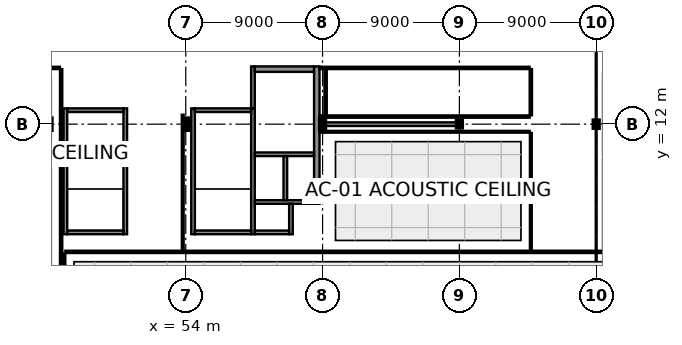
"""IFC4 building model, lengths in metres.
Left out: names, types, materials, properties, quantities, classifications, styles, units other than length and angle.
Written with IfcOpenShell. Run it as: python <this file> out.ifc"""

import sys

from ifc_helpers import new_model, si_unit, direction, frame, frame_2d, origin, origin_2d, place, context, subcontext, project, spatial, rectangle, i_section, extrude, element, fill, save


model = new_model("IFC4")
c1 = context("Model", 3, precision=1e-05, world=origin(), true_north=direction((0.0, 1.0)))
c2 = subcontext(c1, "Body", "Model", "MODEL_VIEW")
j1 = project(units=[si_unit("LENGTHUNIT", "METRE"), si_unit("PLANEANGLEUNIT", "RADIAN")], contexts=[c1])
p1 = place(None, origin())
s1 = spatial("IfcSite", under=j1, at=p1, CompositionType="ELEMENT")
p2 = place(p1, origin())
s2 = spatial("IfcBuilding", under=s1, at=p2, CompositionType="ELEMENT")
p3 = place(p2, frame((0.0, 0.0, 5.4)))
s3 = spatial("IfcBuildingStorey", under=s2, at=p3, CompositionType="ELEMENT", Elevation=5.4)
p4 = place(p3, frame((54.0, 12.0, 0.0), z_axis=(0.0, 0.0, 1.0), x_axis=(1.0, 0.0, 0.0)))
e1 = element("IfcColumn", 1, at=p4, inside=s3, PredefinedType="COLUMN", context=c2, shape_type="SweptSolid", body=[
    extrude(i_section(OverallWidth=0.304, OverallDepth=0.716, WebThickness=0.021, FlangeThickness=0.04, at=origin_2d()), origin(), (0.0, 0.0, 1.0), 4.5),
])
p5 = place(p3, frame((63.0, 12.0, 0.0), z_axis=(0.0, 0.0, 1.0), x_axis=(1.0, 0.0, 0.0)))
e2 = element("IfcColumn", 2, at=p5, inside=s3, PredefinedType="COLUMN", context=c2, shape_type="SweptSolid", body=[
    extrude(i_section(OverallWidth=0.3, OverallDepth=0.5, WebThickness=0.014, FlangeThickness=0.028, at=origin_2d()), origin(), (0.0, 0.0, 1.0), 4.5),
])
p6 = place(p3, frame((72.0, 12.0, 0.0), z_axis=(0.0, 0.0, 1.0), x_axis=(0.0, 1.0, 0.0)))
e3 = element("IfcColumn", 3, at=p6, inside=s3, PredefinedType="COLUMN", context=c2, shape_type="SweptSolid", body=[
    extrude(i_section(OverallWidth=0.3, OverallDepth=0.4, WebThickness=0.013, FlangeThickness=0.024, at=origin_2d()), origin(), (0.0, 0.0, 1.0), 4.5),
])
p7 = place(p3, frame((81.0, 12.0, 0.0), z_axis=(0.0, 0.0, 1.0), x_axis=(1.0, 0.0, 0.0)))
e4 = element("IfcColumn", 4, at=p7, inside=s3, PredefinedType="COLUMN", context=c2, shape_type="SweptSolid", body=[
    extrude(i_section(OverallWidth=0.3, OverallDepth=0.45, WebThickness=0.014, FlangeThickness=0.026, at=origin_2d()), origin(), (0.0, 0.0, 1.0), 4.5),
])
p8 = place(p3, frame((54.48, 4.76, 0.0), z_axis=(0.0, 0.0, 1.0), x_axis=(0.0, 1.0, 0.0)))
e5 = element("IfcWall", 5, at=p8, inside=s3, PredefinedType="SHEAR", context=c2, shape_type="SweptSolid", body=[
    extrude(rectangle(XDim=8.28, YDim=0.24, at=frame_2d((4.14, 0.0))), origin(), (0.0, 0.0, 1.0), 4.31),
])
p9 = place(p3, frame((58.42, 4.76, 0.0), z_axis=(0.0, 0.0, 1.0), x_axis=(0.0, 1.0, 0.0)))
e6 = element("IfcWall", 6, at=p9, inside=s3, PredefinedType="SHEAR", context=c2, shape_type="SweptSolid", body=[
    extrude(rectangle(XDim=8.28, YDim=0.24, at=frame_2d((4.14, 0.0))), origin(), (0.0, 0.0, 1.0), 4.31),
])
p10 = place(p9, frame((6.49, 0.0, 0.0)))
e7 = element("IfcOpeningElement", 7, at=p10, cuts=e6, PredefinedType="OPENING", context=c2, shape_type="SweptSolid", body=[
    extrude(rectangle(XDim=1.3, YDim=2.2, at=frame_2d((0.65, 1.1))), frame((0.0, 0.135, 0.0), z_axis=(0.0, -1.0, 0.0), x_axis=(1.0, 0.0, 0.0)), (0.0, 0.0, 1.0), 0.27),
])
for number, where, z_axis, x_axis in (
    (8, (54.6, 4.88, 0.0), (0.0, 0.0, 1.0), (1.0, 0.0, 0.0)),
    (9, (54.6, 12.92, 0.0), (0.0, 0.0, 1.0), (1.0, 0.0, 0.0)),
):
    element("IfcWall", number, at=place(p3, frame(where, z_axis=z_axis, x_axis=x_axis)), inside=s3, PredefinedType="SHEAR", context=c2, shape_type="SweptSolid", body=[
        extrude(rectangle(XDim=3.7, YDim=0.24, at=frame_2d((1.85, 0.0))), origin(), (0.0, 0.0, 1.0), 4.31),
    ])
p11 = place(p3, frame((46.08, 4.76, 0.0), z_axis=(0.0, 0.0, 1.0), x_axis=(0.0, 1.0, 0.0)))
e10 = element("IfcWall", 10, at=p11, inside=s3, PredefinedType="SHEAR", context=c2, shape_type="SweptSolid", body=[
    extrude(rectangle(XDim=8.28, YDim=0.24, at=frame_2d((4.14, 0.0))), origin(), (0.0, 0.0, 1.0), 4.31),
])
p12 = place(p3, frame((50.02, 4.76, 0.0), z_axis=(0.0, 0.0, 1.0), x_axis=(0.0, 1.0, 0.0)))
e11 = element("IfcWall", 11, at=p12, inside=s3, PredefinedType="SHEAR", context=c2, shape_type="SweptSolid", body=[
    extrude(rectangle(XDim=8.28, YDim=0.24, at=frame_2d((4.14, 0.0))), origin(), (0.0, 0.0, 1.0), 4.31),
])
p13 = place(p12, frame((6.49, 0.0, 0.0)))
e12 = element("IfcOpeningElement", 12, at=p13, cuts=e11, PredefinedType="OPENING", context=c2, shape_type="SweptSolid", body=[
    extrude(rectangle(XDim=1.3, YDim=2.2, at=frame_2d((0.65, 1.1))), frame((0.0, 0.135, 0.0), z_axis=(0.0, -1.0, 0.0), x_axis=(1.0, 0.0, 0.0)), (0.0, 0.0, 1.0), 0.27),
])
for number, where, z_axis, x_axis in (
    (13, (46.2, 4.88, 0.0), (0.0, 0.0, 1.0), (1.0, 0.0, 0.0)),
    (14, (46.2, 12.92, 0.0), (0.0, 0.0, 1.0), (1.0, 0.0, 0.0)),
):
    element("IfcWall", number, at=place(p3, frame(where, z_axis=z_axis, x_axis=x_axis)), inside=s3, PredefinedType="SHEAR", context=c2, shape_type="SweptSolid", body=[
        extrude(rectangle(XDim=3.7, YDim=0.24, at=frame_2d((1.85, 0.0))), origin(), (0.0, 0.0, 1.0), 4.31),
    ])
p14 = place(p3, frame((58.42, 13.04, 0.0), z_axis=(0.0, 0.0, 1.0), x_axis=(0.0, 1.0, 0.0)))
e15 = element("IfcWall", 15, at=p14, inside=s3, PredefinedType="SHEAR", context=c2, shape_type="SweptSolid", body=[
    extrude(rectangle(XDim=2.76, YDim=0.24, at=frame_2d((1.38, 0.0))), origin(), (0.0, 0.0, 1.0), 4.16),
])
p15 = place(p3, frame((58.54, 15.62, 0.0), z_axis=(0.0, 0.0, 1.0), x_axis=(1.0, 0.0, 0.0)))
e16 = element("IfcWall", 16, at=p15, inside=s3, PredefinedType="SHEAR", context=c2, shape_type="SweptSolid", body=[
    extrude(rectangle(XDim=3.9, YDim=0.36, at=frame_2d((1.95, 0.0))), origin(), (0.0, 0.0, 1.0), 4.16),
])
p16 = place(p15, frame((1.15, 0.0, 0.0)))
e17 = element("IfcOpeningElement", 17, at=p16, cuts=e16, PredefinedType="OPENING", context=c2, shape_type="SweptSolid", body=[
    extrude(rectangle(XDim=1.6, YDim=2.25, at=frame_2d((0.8, 1.125))), frame((0.0, 0.195, 0.0), z_axis=(0.0, -1.0, 0.0), x_axis=(1.0, 0.0, 0.0)), (0.0, 0.0, 1.0), 0.39),
])
p17 = place(p3, frame((62.62, 6.76, 0.0), z_axis=(0.0, 0.0, 1.0), x_axis=(0.0, 1.0, 0.0)))
e18 = element("IfcWall", 18, at=p17, inside=s3, PredefinedType="SHEAR", context=c2, shape_type="SweptSolid", body=[
    extrude(rectangle(XDim=9.04, YDim=0.36, at=frame_2d((4.52, 0.0))), origin(), (0.0, 0.0, 1.0), 4.16),
])
p18 = place(p3, frame((58.54, 10.02, 0.0), z_axis=(0.0, 0.0, 1.0), x_axis=(1.0, 0.0, 0.0)))
e19 = element("IfcWall", 19, at=p18, inside=s3, PredefinedType="SHEAR", context=c2, shape_type="SweptSolid", body=[
    extrude(rectangle(XDim=3.9, YDim=0.24, at=frame_2d((1.95, 0.0))), origin(), (0.0, 0.0, 1.0), 4.31),
])
p19 = place(p18, frame((0.235, 0.0, 0.0)))
e20 = element("IfcOpeningElement", 20, at=p19, cuts=e19, PredefinedType="OPENING", context=c2, shape_type="SweptSolid", body=[
    extrude(rectangle(XDim=1.6, YDim=2.3, at=frame_2d((0.8, 1.15))), frame((0.0, 0.135, 0.0), z_axis=(0.0, -1.0, 0.0), x_axis=(1.0, 0.0, 0.0)), (0.0, 0.0, 1.0), 0.27),
])
p20 = place(p18, frame((2.185, 0.0, 0.0)))
e21 = element("IfcOpeningElement", 21, at=p20, cuts=e19, PredefinedType="OPENING", context=c2, shape_type="SweptSolid", body=[
    extrude(rectangle(XDim=1.6, YDim=2.3, at=frame_2d((0.8, 1.15))), frame((0.0, 0.135, 0.0), z_axis=(0.0, -1.0, 0.0), x_axis=(1.0, 0.0, 0.0)), (0.0, 0.0, 1.0), 0.27),
])
p21 = place(p3, frame((58.54, 6.88, 0.0), z_axis=(0.0, 0.0, 1.0), x_axis=(1.0, 0.0, 0.0)))
e22 = element("IfcWall", 22, at=p21, inside=s3, PredefinedType="SHEAR", context=c2, shape_type="SweptSolid", body=[
    extrude(rectangle(XDim=3.9, YDim=0.24, at=frame_2d((1.95, 0.0))), origin(), (0.0, 0.0, 1.0), 4.31),
])
p22 = place(p3, frame((60.55, 7.0, 0.0), z_axis=(0.0, 0.0, 1.0), x_axis=(0.0, 1.0, 0.0)))
e23 = element("IfcWall", 23, at=p22, inside=s3, PredefinedType="SHEAR", context=c2, shape_type="SweptSolid", body=[
    extrude(rectangle(XDim=2.9, YDim=0.24, at=frame_2d((1.45, 0.0))), origin(), (0.0, 0.0, 1.0), 4.31),
])
p23 = place(p3, frame((60.92, 4.76, 0.0), z_axis=(0.0, 0.0, 1.0), x_axis=(0.0, 1.0, 0.0)))
e24 = element("IfcWall", 24, at=p23, inside=s3, PredefinedType="SHEAR", context=c2, shape_type="SweptSolid", body=[
    extrude(rectangle(XDim=2.0, YDim=0.24, at=frame_2d((1.0, 0.0))), origin(), (0.0, 0.0, 1.0), 4.31),
])
p24 = place(p3, frame((58.54, 4.88, 0.0), z_axis=(0.0, 0.0, 1.0), x_axis=(1.0, 0.0, 0.0)))
e25 = element("IfcWall", 25, at=p24, inside=s3, PredefinedType="SHEAR", context=c2, shape_type="SweptSolid", body=[
    extrude(rectangle(XDim=2.26, YDim=0.24, at=frame_2d((1.13, 0.0))), origin(), (0.0, 0.0, 1.0), 4.31),
])
p25 = place(p3, frame((63.008, 12.0, 0.0), z_axis=(0.0, 0.0, 1.0), x_axis=(1.0, 0.0, 0.0)))
e26 = element("IfcWall", 26, at=p25, inside=s3, PredefinedType="SHEAR", context=c2, shape_type="SweptSolid", body=[
    extrude(rectangle(XDim=8.794, YDim=0.24, at=frame_2d((4.397, 0.0))), origin(), (0.0, 0.0, 1.0), 3.585),
])
p26 = place(p3, frame((46.0, 0.145, 0.0), z_axis=(0.0, 0.0, 1.0), x_axis=(0.0, 1.0, 0.0)))
e27 = element("IfcWall", 27, at=p26, inside=s3, PredefinedType="PARTITIONING", context=c2, shape_type="SweptSolid", body=[
    extrude(rectangle(XDim=3.375, YDim=0.15, at=frame_2d((1.688, 0.0))), origin(), (0.0, 0.0, 1.0), 4.14),
])
p27 = place(p3, frame((46.08, 3.6, 0.0), z_axis=(0.0, 0.0, 1.0), x_axis=(1.0, 0.0, 0.0)))
e28 = element("IfcWall", 28, at=p27, inside=s3, PredefinedType="PARTITIONING", context=c2, shape_type="SweptSolid", body=[
    extrude(rectangle(XDim=71.04, YDim=0.15, at=frame_2d((35.52, 0.0))), origin(), (0.0, 0.0, 1.0), 4.14),
])
p28 = place(p27, frame((31.995, 0.0, 0.0)))
e29 = element("IfcOpeningElement", 29, at=p28, cuts=e28, PredefinedType="OPENING", context=c2, shape_type="SweptSolid", body=[
    extrude(rectangle(XDim=1.05, YDim=2.25, at=frame_2d((0.525, 1.125))), frame((0.0, 0.09, 0.0), z_axis=(0.0, -1.0, 0.0), x_axis=(1.0, 0.0, 0.0)), (0.0, 0.0, 1.0), 0.18),
])
p29 = place(p27, frame((68.39, 0.0, 1.05)))
e30 = element("IfcOpeningElement", 30, at=p29, cuts=e28, PredefinedType="OPENING", context=c2, shape_type="SweptSolid", body=[
    extrude(rectangle(XDim=1.8, YDim=1.1, at=frame_2d((0.9, 0.55))), frame((0.0, 0.09, 0.0), z_axis=(0.0, -1.0, 0.0), x_axis=(1.0, 0.0, 0.0)), (0.0, 0.0, 1.0), 0.18),
])
p30 = place(p3, frame((53.8, 12.62, 0.0), z_axis=(0.0, 0.0, 1.0), x_axis=(0.0, -1.0, 0.0)))
e31 = element("IfcWall", 31, at=p30, inside=s3, PredefinedType="PARTITIONING", context=c2, shape_type="SweptSolid", body=[
    extrude(rectangle(XDim=8.95, YDim=0.12, at=frame_2d((4.475, 0.0))), origin(), (0.0, 0.0, 1.0), 3.735),
])
p31 = place(p3, frame((32.545, 15.7, 0.0), z_axis=(0.0, 0.0, 1.0), x_axis=(1.0, 0.0, 0.0)))
e32 = element("IfcWall", 32, at=p31, inside=s3, PredefinedType="PARTITIONING", context=c2, shape_type="SweptSolid", body=[
    extrude(rectangle(XDim=13.175, YDim=0.15, at=frame_2d((6.587, 0.0))), origin(), (0.0, 0.0, 1.0), 4.14),
])
p32 = place(p31, frame((6.062, 0.0, 0.0)))
e33 = element("IfcOpeningElement", 33, at=p32, cuts=e32, PredefinedType="OPENING", context=c2, shape_type="SweptSolid", body=[
    extrude(rectangle(XDim=1.05, YDim=2.25, at=frame_2d((0.525, 1.125))), frame((0.0, 0.09, 0.0), z_axis=(0.0, -1.0, 0.0), x_axis=(1.0, 0.0, 0.0)), (0.0, 0.0, 1.0), 0.18),
])
p33 = place(p3, frame((45.8, 15.62, 0.0), z_axis=(0.0, 0.0, 1.0), x_axis=(0.0, -1.0, 0.0)))
e34 = element("IfcWall", 34, at=p33, inside=s3, PredefinedType="PARTITIONING", context=c2, shape_type="SweptSolid", body=[
    extrude(rectangle(XDim=15.475, YDim=0.15, at=frame_2d((7.738, 0.0))), origin(), (0.0, 0.0, 1.0), 4.14),
])
p34 = place(p3, frame((76.7, 11.42, 0.0), z_axis=(0.0, 0.0, 1.0), x_axis=(0.0, -1.0, 0.0)))
e35 = element("IfcWall", 35, at=p34, inside=s3, PredefinedType="PARTITIONING", context=c2, shape_type="SweptSolid", body=[
    extrude(rectangle(XDim=7.75, YDim=0.12, at=frame_2d((3.875, 0.0))), origin(), (0.0, 0.0, 1.0), 4.14),
])
p35 = place(p34, frame((3.425, 0.0, 0.0)))
e36 = element("IfcOpeningElement", 36, at=p35, cuts=e35, PredefinedType="OPENING", context=c2, shape_type="SweptSolid", body=[
    extrude(rectangle(XDim=0.9, YDim=2.1, at=frame_2d((0.45, 1.05))), frame((0.0, 0.075, 0.0), z_axis=(0.0, -1.0, 0.0), x_axis=(1.0, 0.0, 0.0)), (0.0, 0.0, 1.0), 0.15),
])
p36 = place(p3, frame((62.795, 11.5, 0.0), z_axis=(0.0, 0.0, 1.0), x_axis=(1.0, 0.0, 0.0)))
e37 = element("IfcWall", 37, at=p36, inside=s3, PredefinedType="PARTITIONING", context=c2, shape_type="SweptSolid", body=[
    extrude(rectangle(XDim=13.825, YDim=0.12, at=frame_2d((6.913, 0.0))), origin(), (0.0, 0.0, 1.0), 4.14),
])
p37 = place(p3, frame((76.7, 15.62, 0.0), z_axis=(0.0, 0.0, 1.0), x_axis=(0.0, -1.0, 0.0)))
e38 = element("IfcWall", 38, at=p37, inside=s3, PredefinedType="PARTITIONING", context=c2, shape_type="SweptSolid", body=[
    extrude(rectangle(XDim=3.04, YDim=0.15, at=frame_2d((1.52, 0.0))), origin(), (0.0, 0.0, 1.0), 4.14),
])
p38 = place(p3, frame((76.62, 12.5, 0.0), z_axis=(0.0, 0.0, 1.0), x_axis=(-1.0, 0.0, 0.0)))
e39 = element("IfcWall", 39, at=p38, inside=s3, PredefinedType="PARTITIONING", context=c2, shape_type="SweptSolid", body=[
    extrude(rectangle(XDim=13.825, YDim=0.15, at=frame_2d((6.913, 0.0))), origin(), (0.0, 0.0, 1.0), 4.14),
])
p39 = place(p3, frame((63.2, 12.57, 0.0), z_axis=(0.0, 0.0, 1.0), x_axis=(0.0, 1.0, 0.0)))
e40 = element("IfcWall", 40, at=p39, inside=s3, PredefinedType="PARTITIONING", context=c2, shape_type="SweptSolid", body=[
    extrude(rectangle(XDim=3.05, YDim=0.15, at=frame_2d((1.525, 0.0))), origin(), (0.0, 0.0, 1.0), 3.685),
])
p40 = place(p3, frame((62.795, 15.7, 0.0), z_axis=(0.0, 0.0, 1.0), x_axis=(1.0, 0.0, 0.0)))
e41 = element("IfcWall", 41, at=p40, inside=s3, PredefinedType="PARTITIONING", context=c2, shape_type="SweptSolid", body=[
    extrude(rectangle(XDim=13.825, YDim=0.15, at=frame_2d((6.913, 0.0))), origin(), (0.0, 0.0, 1.0), 4.14),
])
p41 = place(p40, frame((6.388, 0.0, 0.0)))
e42 = element("IfcOpeningElement", 42, at=p41, cuts=e41, PredefinedType="OPENING", context=c2, shape_type="SweptSolid", body=[
    extrude(rectangle(XDim=1.05, YDim=2.25, at=frame_2d((0.525, 1.125))), frame((0.0, 0.09, 0.0), z_axis=(0.0, -1.0, 0.0), x_axis=(1.0, 0.0, 0.0)), (0.0, 0.0, 1.0), 0.18),
])
p42 = place(p10, frame((1.3, 0.0, 0.0), z_axis=(0.0, 0.0, 1.0), x_axis=(-1.0, 0.0, 0.0)))
e43 = element("IfcDoor", 43, at=p42, inside=s3, OperationType="SINGLE_SWING_LEFT", PredefinedType="DOOR", context=c2, shape_type="SweptSolid", body=[
    extrude(rectangle(XDim=1.3, YDim=2.2, at=frame_2d((0.65, 1.1))), frame((0.0, 0.025, 0.0), z_axis=(0.0, -1.0, 0.0), x_axis=(1.0, 0.0, 0.0)), (0.0, 0.0, 1.0), 0.05),
])
fill(e7, e43)
p43 = place(p13, frame((1.3, 0.0, 0.0), z_axis=(0.0, 0.0, 1.0), x_axis=(-1.0, 0.0, 0.0)))
e44 = element("IfcDoor", 44, at=p43, inside=s3, OperationType="SINGLE_SWING_LEFT", PredefinedType="DOOR", context=c2, shape_type="SweptSolid", body=[
    extrude(rectangle(XDim=1.3, YDim=2.2, at=frame_2d((0.65, 1.1))), frame((0.0, 0.025, 0.0), z_axis=(0.0, -1.0, 0.0), x_axis=(1.0, 0.0, 0.0)), (0.0, 0.0, 1.0), 0.05),
])
fill(e12, e44)
p44 = place(p16, origin())
e45 = element("IfcDoor", 45, at=p44, inside=s3, OperationType="DOUBLE_DOOR_SINGLE_SWING", PredefinedType="DOOR", context=c2, shape_type="SweptSolid", body=[
    extrude(rectangle(XDim=1.6, YDim=2.25, at=frame_2d((0.8, 1.125))), frame((0.0, 0.025, 0.0), z_axis=(0.0, -1.0, 0.0), x_axis=(1.0, 0.0, 0.0)), (0.0, 0.0, 1.0), 0.05),
])
fill(e17, e45)
p45 = place(p19, origin())
e46 = element("IfcDoor", 46, at=p45, inside=s3, OperationType="DOUBLE_DOOR_SLIDING", PredefinedType="DOOR", context=c2, shape_type="SweptSolid", body=[
    extrude(rectangle(XDim=1.6, YDim=2.3, at=frame_2d((0.8, 1.15))), frame((0.0, 0.025, 0.0), z_axis=(0.0, -1.0, 0.0), x_axis=(1.0, 0.0, 0.0)), (0.0, 0.0, 1.0), 0.05),
])
fill(e20, e46)
p46 = place(p20, origin())
e47 = element("IfcDoor", 47, at=p46, inside=s3, OperationType="DOUBLE_DOOR_SLIDING", PredefinedType="DOOR", context=c2, shape_type="SweptSolid", body=[
    extrude(rectangle(XDim=1.6, YDim=2.3, at=frame_2d((0.8, 1.15))), frame((0.0, 0.025, 0.0), z_axis=(0.0, -1.0, 0.0), x_axis=(1.0, 0.0, 0.0)), (0.0, 0.0, 1.0), 0.05),
])
fill(e21, e47)
p47 = place(p28, frame((1.05, 0.0, 0.0), z_axis=(0.0, 0.0, 1.0), x_axis=(-1.0, 0.0, 0.0)))
e48 = element("IfcDoor", 48, at=p47, inside=s3, OperationType="SINGLE_SWING_LEFT", PredefinedType="DOOR", context=c2, shape_type="SweptSolid", body=[
    extrude(rectangle(XDim=1.05, YDim=2.25, at=frame_2d((0.525, 1.125))), frame((0.0, 0.025, 0.0), z_axis=(0.0, -1.0, 0.0), x_axis=(1.0, 0.0, 0.0)), (0.0, 0.0, 1.0), 0.05),
])
fill(e29, e48)
p48 = place(p35, origin())
e49 = element("IfcDoor", 49, at=p48, inside=s3, OperationType="SINGLE_SWING_LEFT", PredefinedType="DOOR", context=c2, shape_type="SweptSolid", body=[
    extrude(rectangle(XDim=0.9, YDim=2.1, at=frame_2d((0.45, 1.05))), frame((0.0, 0.025, 0.0), z_axis=(0.0, -1.0, 0.0), x_axis=(1.0, 0.0, 0.0)), (0.0, 0.0, 1.0), 0.05),
])
fill(e36, e49)
p49 = place(p41, frame((1.05, 0.0, 0.0), z_axis=(0.0, 0.0, 1.0), x_axis=(-1.0, 0.0, 0.0)))
e50 = element("IfcDoor", 50, at=p49, inside=s3, OperationType="SINGLE_SWING_RIGHT", PredefinedType="DOOR", context=c2, shape_type="SweptSolid", body=[
    extrude(rectangle(XDim=1.05, YDim=2.25, at=frame_2d((0.525, 1.125))), frame((0.0, 0.025, 0.0), z_axis=(0.0, -1.0, 0.0), x_axis=(1.0, 0.0, 0.0)), (0.0, 0.0, 1.0), 0.05),
])
fill(e42, e50)
save(model, sys.argv[1])
